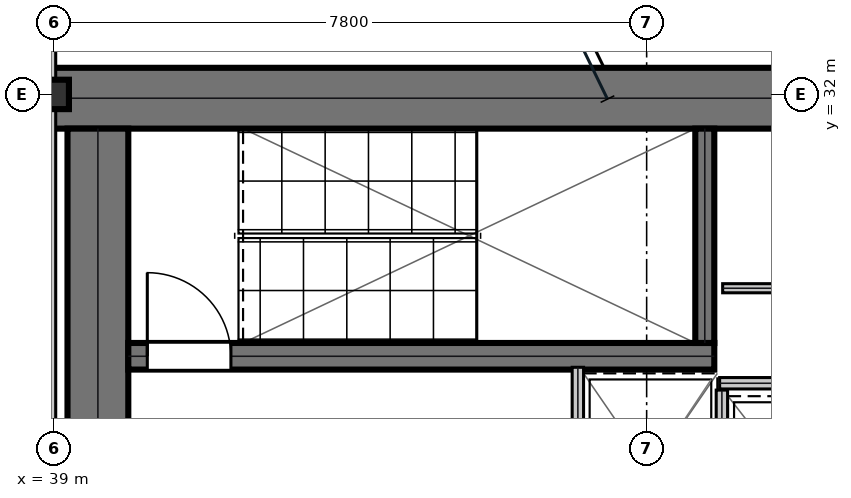
"""IFC4 building model, lengths in metres.
Left out: names, types, materials, properties, quantities, classifications, styles, units other than length and angle.
Written with IfcOpenShell. Run it as: python <this file> out.ifc"""

import sys

from ifc_helpers import new_model, si_unit, direction, frame, frame_2d, origin, origin_2d, place, context, subcontext, project, spatial, rectangle, i_section, extrude, element, fill, save


model = new_model("IFC4")
c1 = context("Model", 3, precision=1e-05, world=origin(), true_north=direction((0.0, 1.0)))
c2 = subcontext(c1, "Body", "Model", "MODEL_VIEW")
j1 = project(units=[si_unit("LENGTHUNIT", "METRE"), si_unit("PLANEANGLEUNIT", "RADIAN")], contexts=[c1])
p1 = place(None, origin())
s1 = spatial("IfcSite", under=j1, at=p1, CompositionType="ELEMENT")
p2 = place(p1, origin())
s2 = spatial("IfcBuilding", under=s1, at=p2, CompositionType="ELEMENT")
p3 = place(p2, frame((0.0, 0.0, 116.85)))
s3 = spatial("IfcBuildingStorey", under=s2, at=p3, CompositionType="ELEMENT", Elevation=116.85)
p4 = place(p3, frame((38.8, 31.95, 0.0), z_axis=(0.0, 0.0, 1.0), x_axis=(1.0, 0.0, 0.0)))
e1 = element("IfcWall", 1, at=p4, inside=s3, PredefinedType="SHEAR", context=c2, shape_type="SweptSolid", body=[
    extrude(rectangle(XDim=16.0, YDim=0.8, at=frame_2d((8.0, 0.0))), origin(), (0.0, 0.0, 1.0), 3.81),
])
p5 = place(p3, frame((39.58, 25.4, 0.0), z_axis=(0.0, 0.0, 1.0), x_axis=(0.0, 1.0, 0.0)))
e2 = element("IfcWall", 2, at=p5, inside=s3, PredefinedType="SHEAR", context=c2, shape_type="SweptSolid", body=[
    extrude(rectangle(XDim=6.15, YDim=0.8, at=frame_2d((3.075, 0.0))), origin(), (0.0, 0.0, 1.0), 3.81),
])
p6 = place(p3, frame((39.98, 28.555, 0.0), z_axis=(0.0, 0.0, 1.0), x_axis=(1.0, 0.0, 0.0)))
e3 = element("IfcWall", 3, at=p6, inside=s3, PredefinedType="SHEAR", context=c2, shape_type="SweptSolid", body=[
    extrude(rectangle(XDim=7.71, YDim=0.35, at=frame_2d((3.855, 0.0))), origin(), (0.0, 0.0, 1.0), 3.81),
])
p7 = place(p6, frame((0.25, 0.0, 0.0)))
e4 = element("IfcOpeningElement", 4, at=p7, cuts=e3, PredefinedType="OPENING", context=c2, shape_type="SweptSolid", body=[
    extrude(rectangle(XDim=1.1, YDim=2.15, at=frame_2d((0.55, 1.075))), frame((0.0, 0.185, 0.0), z_axis=(0.0, -1.0, 0.0), x_axis=(1.0, 0.0, 0.0)), (0.0, 0.0, 1.0), 0.37),
])
p8 = place(p3, frame((47.565, 28.73, 0.0), z_axis=(0.0, 0.0, 1.0), x_axis=(0.0, 1.0, 0.0)))
e5 = element("IfcWall", 5, at=p8, inside=s3, PredefinedType="SHEAR", context=c2, shape_type="SweptSolid", body=[
    extrude(rectangle(XDim=2.82, YDim=0.25, at=frame_2d((1.41, 0.0))), origin(), (0.0, 0.0, 1.0), 3.81),
])
p9 = place(p3, frame((39.0, 32.0, 0.0), z_axis=(0.0, 0.0, 1.0), x_axis=(1.0, 0.0, 0.0)))
e6 = element("IfcColumn", 6, at=p9, inside=s3, PredefinedType="COLUMN", context=c2, shape_type="SweptSolid", body=[
    extrude(i_section(OverallWidth=0.398, OverallDepth=0.387, WebThickness=0.021, FlangeThickness=0.033, at=origin_2d()), origin(), (0.0, 0.0, 1.0), 4.044),
])
p10 = place(p3, frame((45.895, 25.69, 0.0), z_axis=(0.0, 0.0, 1.0), x_axis=(0.0, 1.0, 0.0)))
e7 = element("IfcWall", 7, at=p10, inside=s3, PredefinedType="PARTITIONING", context=c2, shape_type="SweptSolid", body=[
    extrude(rectangle(XDim=2.72, YDim=0.15, at=frame_2d((1.36, 0.0))), origin(), (0.0, 0.0, 1.0), 3.81),
])
p11 = place(p10, frame((0.81, 0.0, 0.0)))
e8 = element("IfcOpeningElement", 8, at=p11, cuts=e7, PredefinedType="OPENING", context=c2, shape_type="SweptSolid", body=[
    extrude(rectangle(XDim=1.1, YDim=2.15, at=frame_2d((0.55, 1.075))), frame((0.0, 0.085, 0.0), z_axis=(0.0, -1.0, 0.0), x_axis=(1.0, 0.0, 0.0)), (0.0, 0.0, 1.0), 0.17),
])
p12 = place(p3, frame((47.79, 25.695, 0.0), z_axis=(0.0, 0.0, 1.0), x_axis=(0.0, 1.0, 0.0)))
e9 = element("IfcWall", 9, at=p12, inside=s3, PredefinedType="PARTITIONING", context=c2, shape_type="SweptSolid", body=[
    extrude(rectangle(XDim=2.415, YDim=0.15, at=frame_2d((1.208, 0.0))), origin(), (0.0, 0.0, 1.0), 3.81),
])
p13 = place(p3, frame((47.76, 28.2, 0.0), z_axis=(0.0, 0.0, 1.0), x_axis=(1.0, 0.0, 0.0)))
e10 = element("IfcWall", 10, at=p13, inside=s3, PredefinedType="PARTITIONING", context=c2, shape_type="SweptSolid", body=[
    extrude(rectangle(XDim=1.99, YDim=0.15, at=frame_2d((0.995, 0.0))), origin(), (0.0, 0.0, 1.0), 3.81),
])
p14 = place(p3, frame((47.8, 29.45, 0.0), z_axis=(0.0, 0.0, 1.0), x_axis=(1.0, 0.0, 0.0)))
e11 = element("IfcWall", 11, at=p14, inside=s3, PredefinedType="PARTITIONING", context=c2, shape_type="SweptSolid", body=[
    extrude(rectangle(XDim=5.86, YDim=0.12, at=frame_2d((2.93, 0.0))), origin(), (0.0, 0.0, 1.0), 3.81),
])
p15 = place(p14, frame((3.4, 0.0, 0.0)))
e12 = element("IfcOpeningElement", 12, at=p15, cuts=e11, PredefinedType="OPENING", context=c2, shape_type="SweptSolid", body=[
    extrude(rectangle(XDim=0.85, YDim=2.15, at=frame_2d((0.425, 1.075))), frame((0.0, 0.07, 0.0), z_axis=(0.0, -1.0, 0.0), x_axis=(1.0, 0.0, 0.0)), (0.0, 0.0, 1.0), 0.14),
])
p16 = place(p3, frame((38.95, 25.3, 0.0), z_axis=(0.0, 0.0, 1.0), x_axis=(0.0, 1.0, 0.0)))
e13 = element("IfcWall", 13, at=p16, inside=s3, PredefinedType="PARTITIONING", context=c2, shape_type="SweptSolid", body=[
    extrude(rectangle(XDim=8.2, YDim=0.15, at=frame_2d((4.1, 0.0))), origin(), (0.0, 0.0, 1.0), 3.19),
])
p17 = place(p7, origin())
e14 = element("IfcDoor", 14, at=p17, inside=s3, OperationType="SINGLE_SWING_LEFT", PredefinedType="DOOR", context=c2, shape_type="SweptSolid", body=[
    extrude(rectangle(XDim=1.1, YDim=2.15, at=frame_2d((0.55, 1.075))), frame((0.0, 0.025, 0.0), z_axis=(0.0, -1.0, 0.0), x_axis=(1.0, 0.0, 0.0)), (0.0, 0.0, 1.0), 0.05),
])
fill(e4, e14)
save(model, sys.argv[1])
